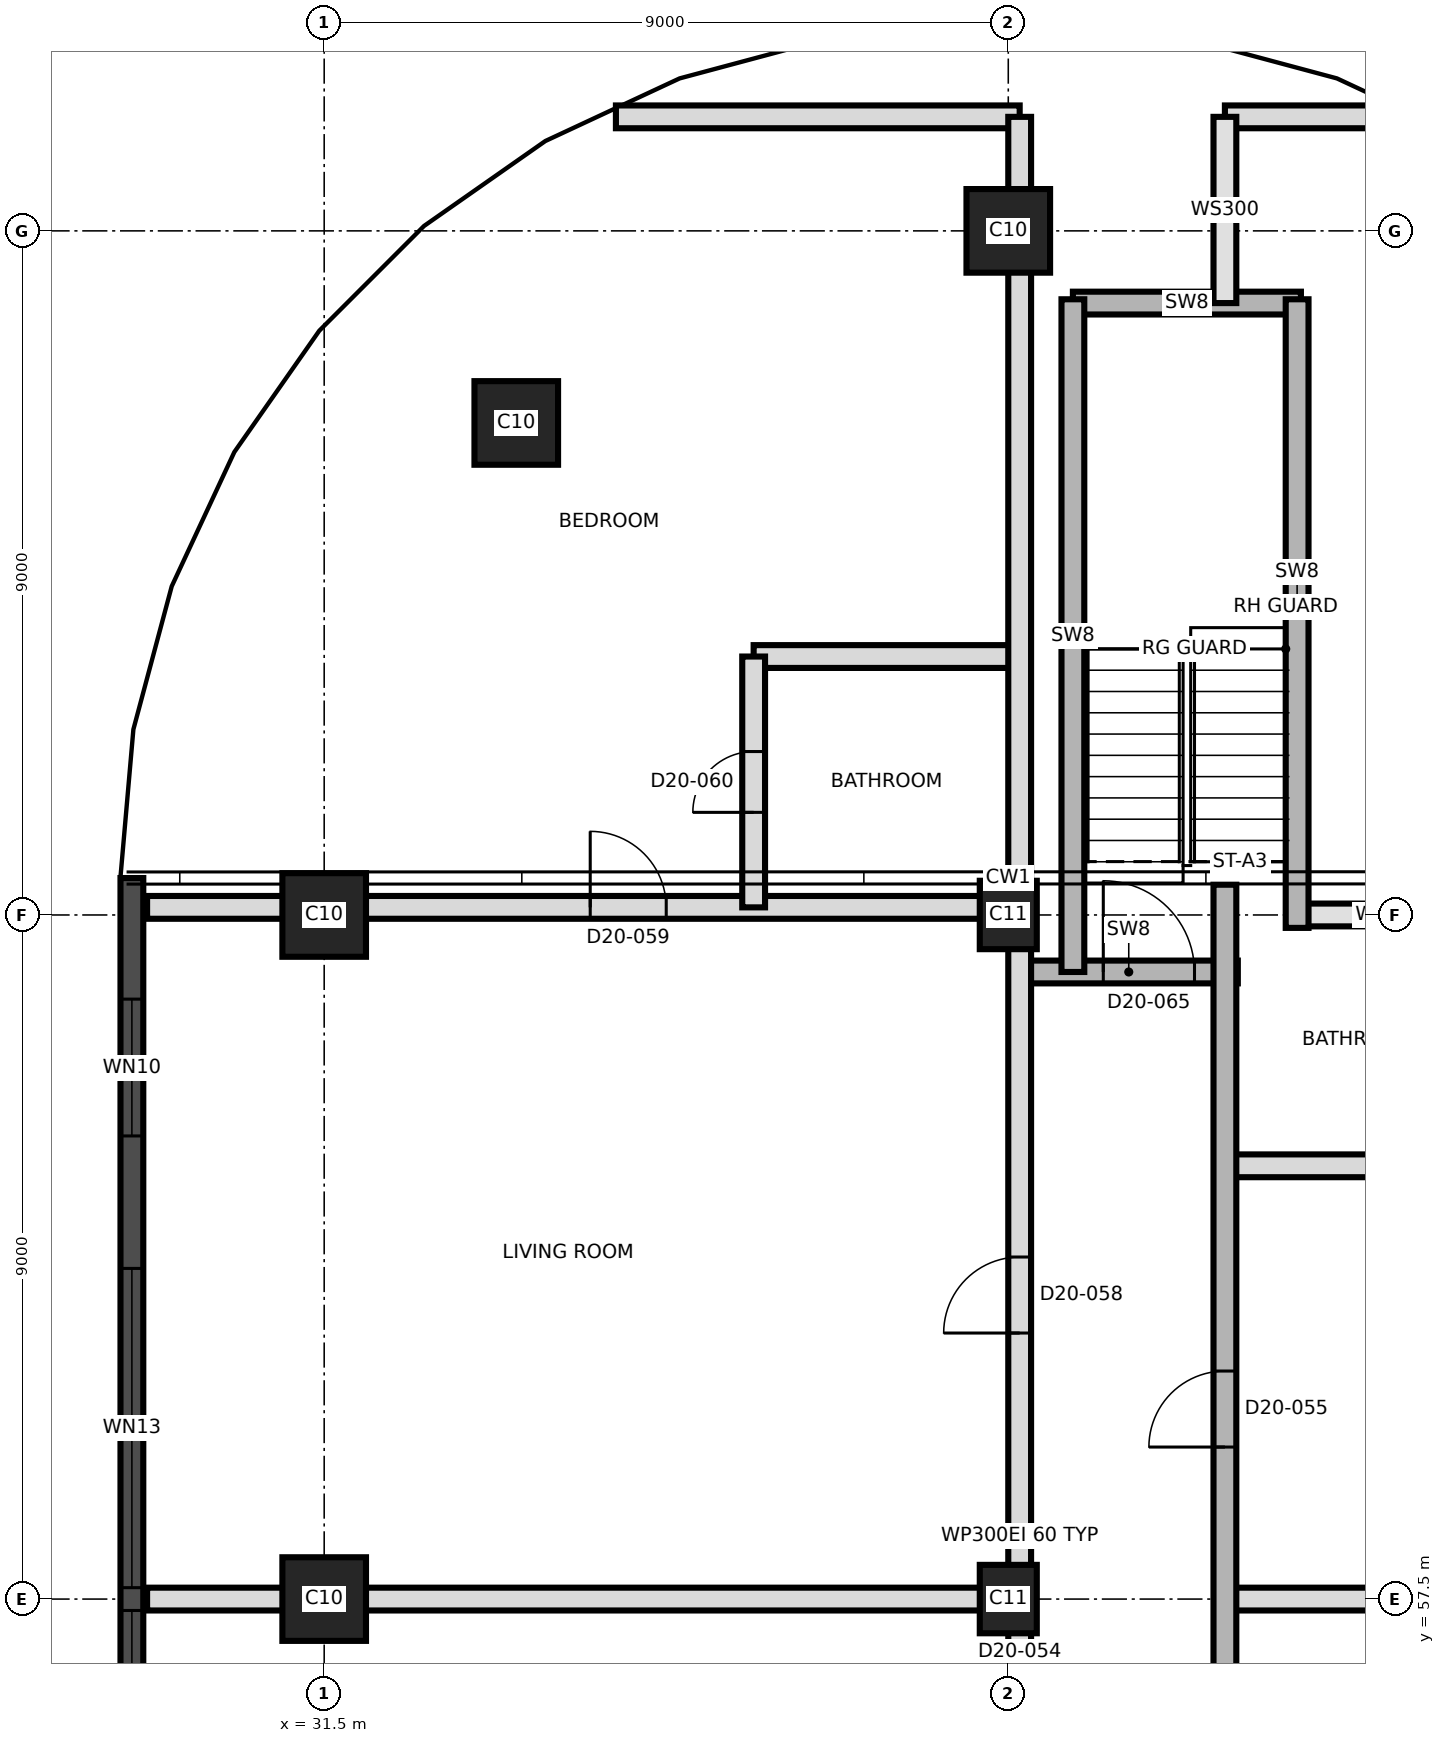
"""IFC4 building model, lengths in metres.
Left out: names, types, materials, properties, quantities, classifications, styles, units other than length and angle.
Written with IfcOpenShell. Run it as: python <this file> out.ifc"""

import sys

from ifc_helpers import new_model, si_unit, direction, frame, frame_2d, origin, origin_2d, place, context, subcontext, project, spatial, rectangle, extrude, element, fill, save


model = new_model("IFC4")
c1 = context("Model", 3, precision=1e-05, world=origin(), true_north=direction((0.0, 1.0)))
c2 = subcontext(c1, "Body", "Model", "MODEL_VIEW")
j1 = project(units=[si_unit("LENGTHUNIT", "METRE"), si_unit("PLANEANGLEUNIT", "RADIAN")], contexts=[c1])
p1 = place(None, origin())
s1 = spatial("IfcSite", under=j1, at=p1, CompositionType="ELEMENT")
p2 = place(p1, origin())
s2 = spatial("IfcBuilding", under=s1, at=p2, CompositionType="ELEMENT")
p3 = place(p2, frame((0.0, 0.0, 182.9)))
s3 = spatial("IfcBuildingStorey", under=s2, at=p3, CompositionType="ELEMENT", Elevation=182.9)
p4 = place(p3, frame((31.5, 57.5, 0.0), z_axis=(0.0, 0.0, 1.0), x_axis=(1.0, 0.0, 0.0)))
e1 = element("IfcColumn", 1, at=p4, inside=s3, PredefinedType="COLUMN", context=c2, shape_type="SweptSolid", body=[
    extrude(rectangle(XDim=1.1, YDim=1.1, at=origin_2d()), origin(), (0.0, 0.0, 1.0), 3.7),
])
p5 = place(p3, frame((40.5, 57.5, 0.0), z_axis=(0.0, 0.0, 1.0), x_axis=(0.0, 1.0, 0.0)))
e2 = element("IfcColumn", 2, at=p5, inside=s3, PredefinedType="COLUMN", context=c2, shape_type="SweptSolid", body=[
    extrude(rectangle(XDim=0.9, YDim=0.75, at=origin_2d()), origin(), (0.0, 0.0, 1.0), 3.7),
])
p6 = place(p3, frame((31.5, 66.5, 0.0), z_axis=(0.0, 0.0, 1.0), x_axis=(1.0, 0.0, 0.0)))
e3 = element("IfcColumn", 3, at=p6, inside=s3, PredefinedType="COLUMN", context=c2, shape_type="SweptSolid", body=[
    extrude(rectangle(XDim=1.1, YDim=1.1, at=origin_2d()), origin(), (0.0, 0.0, 1.0), 3.7),
])
p7 = place(p3, frame((40.5, 66.5, 0.0), z_axis=(0.0, 0.0, 1.0), x_axis=(0.0, 1.0, 0.0)))
e4 = element("IfcColumn", 4, at=p7, inside=s3, PredefinedType="COLUMN", context=c2, shape_type="SweptSolid", body=[
    extrude(rectangle(XDim=0.9, YDim=0.75, at=origin_2d()), origin(), (0.0, 0.0, 1.0), 3.7),
])
for number, where, z_axis, x_axis in (
    (5, (34.027, 72.973, 0.0), (0.0, 0.0, 1.0), (1.0, 0.0, 0.0)),
    (6, (40.5, 75.5, 0.0), (0.0, 0.0, 1.0), (1.0, 0.0, 0.0)),
):
    element("IfcColumn", number, at=place(p3, frame(where, z_axis=z_axis, x_axis=x_axis)), inside=s3, PredefinedType="COLUMN", context=c2, shape_type="SweptSolid", body=[
        extrude(rectangle(XDim=1.1, YDim=1.1, at=origin_2d()), origin(), (0.0, 0.0, 1.0), 3.7),
    ])
p8 = place(p3, frame((28.97, 66.986, 0.0), z_axis=(0.0, 0.0, 1.0), x_axis=(0.0, -1.0, 0.0)))
e7 = element("IfcWall", 7, at=p8, inside=s3, PredefinedType="SOLIDWALL", context=c2, shape_type="SweptSolid", body=[
    extrude(rectangle(XDim=32.976, YDim=0.3, at=frame_2d((16.488, 0.0))), origin(), (0.0, 0.0, 1.0), 3.4),
])
p9 = place(p8, frame((1.593, 0.0, 0.3)))
e8 = element("IfcOpeningElement", 8, at=p9, cuts=e7, PredefinedType="OPENING", context=c2, shape_type="SweptSolid", body=[
    extrude(rectangle(XDim=1.8, YDim=2.4, at=frame_2d((0.9, 1.2))), frame((0.0, 0.16, 0.0), z_axis=(0.0, -1.0, 0.0), x_axis=(1.0, 0.0, 0.0)), (0.0, 0.0, 1.0), 0.32),
])
p10 = place(p8, frame((5.136, 0.0, 0.9)))
e9 = element("IfcOpeningElement", 9, at=p10, cuts=e7, PredefinedType="OPENING", context=c2, shape_type="SweptSolid", body=[
    extrude(rectangle(XDim=4.2, YDim=1.7, at=frame_2d((2.1, 0.85))), frame((0.0, 0.16, 0.0), z_axis=(0.0, -1.0, 0.0), x_axis=(1.0, 0.0, 0.0)), (0.0, 0.0, 1.0), 0.32),
])
p11 = place(p8, frame((9.636, 0.0, 0.9)))
e10 = element("IfcOpeningElement", 10, at=p11, cuts=e7, PredefinedType="OPENING", context=c2, shape_type="SweptSolid", body=[
    extrude(rectangle(XDim=4.2, YDim=1.7, at=frame_2d((2.1, 0.85))), frame((0.0, 0.16, 0.0), z_axis=(0.0, -1.0, 0.0), x_axis=(1.0, 0.0, 0.0)), (0.0, 0.0, 1.0), 0.32),
])
p12 = place(p8, frame((14.136, 0.0, 0.9)))
e11 = element("IfcOpeningElement", 11, at=p12, cuts=e7, PredefinedType="OPENING", context=c2, shape_type="SweptSolid", body=[
    extrude(rectangle(XDim=4.2, YDim=1.7, at=frame_2d((2.1, 0.85))), frame((0.0, 0.16, 0.0), z_axis=(0.0, -1.0, 0.0), x_axis=(1.0, 0.0, 0.0)), (0.0, 0.0, 1.0), 0.32),
])
p13 = place(p8, frame((18.636, 0.0, 0.9)))
e12 = element("IfcOpeningElement", 12, at=p13, cuts=e7, PredefinedType="OPENING", context=c2, shape_type="SweptSolid", body=[
    extrude(rectangle(XDim=4.2, YDim=1.7, at=frame_2d((2.1, 0.85))), frame((0.0, 0.16, 0.0), z_axis=(0.0, -1.0, 0.0), x_axis=(1.0, 0.0, 0.0)), (0.0, 0.0, 1.0), 0.32),
])
p14 = place(p8, frame((23.136, 0.0, 0.9)))
e13 = element("IfcOpeningElement", 13, at=p14, cuts=e7, PredefinedType="OPENING", context=c2, shape_type="SweptSolid", body=[
    extrude(rectangle(XDim=4.2, YDim=1.7, at=frame_2d((2.1, 0.85))), frame((0.0, 0.16, 0.0), z_axis=(0.0, -1.0, 0.0), x_axis=(1.0, 0.0, 0.0)), (0.0, 0.0, 1.0), 0.32),
])
p15 = place(p8, frame((29.331, 0.0, 0.3)))
e14 = element("IfcOpeningElement", 14, at=p15, cuts=e7, PredefinedType="OPENING", context=c2, shape_type="SweptSolid", body=[
    extrude(rectangle(XDim=1.8, YDim=2.4, at=frame_2d((0.9, 1.2))), frame((0.0, 0.16, 0.0), z_axis=(0.0, -1.0, 0.0), x_axis=(1.0, 0.0, 0.0)), (0.0, 0.0, 1.0), 0.32),
])
p16 = place(p3, frame((29.17, 57.5, 0.0), z_axis=(0.0, 0.0, 1.0), x_axis=(1.0, 0.0, 0.0)))
e15 = element("IfcWall", 15, at=p16, inside=s3, PredefinedType="PARTITIONING", context=c2, shape_type="SweptSolid", body=[
    extrude(rectangle(XDim=11.48, YDim=0.3, at=frame_2d((5.74, 0.0))), origin(), (0.0, 0.0, 1.0), 3.4),
])
p17 = place(p3, frame((43.35, 57.5, 0.0), z_axis=(0.0, 0.0, 1.0), x_axis=(1.0, 0.0, 0.0)))
e16 = element("IfcWall", 16, at=p17, inside=s3, PredefinedType="PARTITIONING", context=c2, shape_type="SweptSolid", body=[
    extrude(rectangle(XDim=8.66, YDim=0.3, at=frame_2d((4.33, 0.0))), origin(), (0.0, 0.0, 1.0), 3.4),
])
p18 = place(p3, frame((43.35, 63.2, 0.0), z_axis=(0.0, 0.0, 1.0), x_axis=(1.0, 0.0, 0.0)))
e17 = element("IfcWall", 17, at=p18, inside=s3, PredefinedType="PARTITIONING", context=c2, shape_type="SweptSolid", body=[
    extrude(rectangle(XDim=8.62, YDim=0.3, at=frame_2d((4.31, 0.0))), origin(), (0.0, 0.0, 1.0), 3.4),
])
p19 = place(p18, frame((4.65, 0.0, 0.0)))
e18 = element("IfcOpeningElement", 18, at=p19, cuts=e17, PredefinedType="OPENING", context=c2, shape_type="SweptSolid", body=[
    extrude(rectangle(XDim=1.0, YDim=2.1, at=frame_2d((0.5, 1.05))), frame((0.0, 0.16, 0.0), z_axis=(0.0, -1.0, 0.0), x_axis=(1.0, 0.0, 0.0)), (0.0, 0.0, 1.0), 0.32),
])
p20 = place(p3, frame((40.65, 65.75, 0.0), z_axis=(0.0, 0.0, 1.0), x_axis=(1.0, 0.0, 0.0)))
e19 = element("IfcWall", 19, at=p20, inside=s3, PredefinedType="SHEAR", context=c2, shape_type="SweptSolid", body=[
    extrude(rectangle(XDim=2.87, YDim=0.3, at=frame_2d((1.435, 0.0))), origin(), (0.0, 0.0, 1.0), 3.4),
])
p21 = place(p20, frame((1.1, 0.0, 0.0)))
e20 = element("IfcOpeningElement", 20, at=p21, cuts=e19, PredefinedType="OPENING", context=c2, shape_type="SweptSolid", body=[
    extrude(rectangle(XDim=1.2, YDim=2.1, at=frame_2d((0.6, 1.05))), frame((0.0, 0.16, 0.0), z_axis=(0.0, -1.0, 0.0), x_axis=(1.0, 0.0, 0.0)), (0.0, 0.0, 1.0), 0.32),
])
p22 = place(p3, frame((44.18, 66.5, 0.0), z_axis=(0.0, 0.0, 1.0), x_axis=(1.0, 0.0, 0.0)))
e21 = element("IfcWall", 21, at=p22, inside=s3, PredefinedType="SOLIDWALL", context=c2, shape_type="SweptSolid", body=[
    extrude(rectangle(XDim=2.67, YDim=0.3, at=frame_2d((1.335, 0.0))), origin(), (0.0, 0.0, 1.0), 3.4),
])
p23 = place(p3, frame((29.17, 66.6, 0.0), z_axis=(0.0, 0.0, 1.0), x_axis=(1.0, 0.0, 0.0)))
e22 = element("IfcWall", 22, at=p23, inside=s3, PredefinedType="PARTITIONING", context=c2, shape_type="SweptSolid", body=[
    extrude(rectangle(XDim=11.48, YDim=0.3, at=frame_2d((5.74, 0.0))), origin(), (0.0, 0.0, 1.0), 3.4),
])
p24 = place(p23, frame((5.83, 0.0, 0.0)))
e23 = element("IfcOpeningElement", 23, at=p24, cuts=e22, PredefinedType="OPENING", context=c2, shape_type="SweptSolid", body=[
    extrude(rectangle(XDim=1.0, YDim=2.1, at=frame_2d((0.5, 1.05))), frame((0.0, 0.16, 0.0), z_axis=(0.0, -1.0, 0.0), x_axis=(1.0, 0.0, 0.0)), (0.0, 0.0, 1.0), 0.32),
])
p25 = place(p3, frame((37.15, 69.9, 0.0), z_axis=(0.0, 0.0, 1.0), x_axis=(1.0, 0.0, 0.0)))
e24 = element("IfcWall", 24, at=p25, inside=s3, PredefinedType="PARTITIONING", context=c2, shape_type="SweptSolid", body=[
    extrude(rectangle(XDim=3.5, YDim=0.3, at=frame_2d((1.75, 0.0))), origin(), (0.0, 0.0, 1.0), 3.4),
])
p26 = place(p3, frame((41.35, 74.55, 0.0), z_axis=(0.0, 0.0, 1.0), x_axis=(1.0, 0.0, 0.0)))
e25 = element("IfcWall", 25, at=p26, inside=s3, PredefinedType="SHEAR", context=c2, shape_type="SweptSolid", body=[
    extrude(rectangle(XDim=3.0, YDim=0.3, at=frame_2d((1.5, 0.0))), origin(), (0.0, 0.0, 1.0), 3.4),
])
p27 = place(p3, frame((35.338, 77.0, 0.0), z_axis=(0.0, 0.0, 1.0), x_axis=(1.0, 0.0, 0.0)))
e26 = element("IfcWall", 26, at=p27, inside=s3, PredefinedType="PARTITIONING", context=c2, shape_type="SweptSolid", body=[
    extrude(rectangle(XDim=5.312, YDim=0.3, at=frame_2d((2.656, 0.0))), origin(), (0.0, 0.0, 1.0), 3.4),
])
p28 = place(p3, frame((43.35, 77.0, 0.0), z_axis=(0.0, 0.0, 1.0), x_axis=(1.0, 0.0, 0.0)))
e27 = element("IfcWall", 27, at=p28, inside=s3, PredefinedType="PARTITIONING", context=c2, shape_type="SweptSolid", body=[
    extrude(rectangle(XDim=2.312, YDim=0.3, at=frame_2d((1.156, 0.0))), origin(), (0.0, 0.0, 1.0), 3.4),
])
p29 = place(p3, frame((37.15, 66.6, 0.0), z_axis=(0.0, 0.0, 1.0), x_axis=(0.0, 1.0, 0.0)))
e28 = element("IfcWall", 28, at=p29, inside=s3, PredefinedType="PARTITIONING", context=c2, shape_type="SweptSolid", body=[
    extrude(rectangle(XDim=3.3, YDim=0.3, at=frame_2d((1.65, 0.0))), origin(), (0.0, 0.0, 1.0), 3.4),
])
p30 = place(p29, frame((1.25, 0.0, 0.0)))
e29 = element("IfcOpeningElement", 29, at=p30, cuts=e28, PredefinedType="OPENING", context=c2, shape_type="SweptSolid", body=[
    extrude(rectangle(XDim=0.8, YDim=2.1, at=frame_2d((0.4, 1.05))), frame((0.0, 0.16, 0.0), z_axis=(0.0, -1.0, 0.0), x_axis=(1.0, 0.0, 0.0)), (0.0, 0.0, 1.0), 0.32),
])
p31 = place(p3, frame((40.65, 39.65, 0.0), z_axis=(0.0, 0.0, 1.0), x_axis=(0.0, 1.0, 0.0)))
e30 = element("IfcWall", 30, at=p31, inside=s3, PredefinedType="PARTITIONING", context=c2, shape_type="SweptSolid", body=[
    extrude(rectangle(XDim=37.35, YDim=0.3, at=frame_2d((18.675, 0.0))), origin(), (0.0, 0.0, 1.0), 3.4),
])
p32 = place(p31, frame((1.0, 0.0, 0.0)))
e31 = element("IfcOpeningElement", 31, at=p32, cuts=e30, PredefinedType="OPENING", context=c2, shape_type="SweptSolid", body=[
    extrude(rectangle(XDim=1.0, YDim=2.1, at=frame_2d((0.5, 1.05))), frame((0.0, 0.16, 0.0), z_axis=(0.0, -1.0, 0.0), x_axis=(1.0, 0.0, 0.0)), (0.0, 0.0, 1.0), 0.32),
])
p33 = place(p31, frame((6.85, 0.0, 0.0)))
e32 = element("IfcOpeningElement", 32, at=p33, cuts=e30, PredefinedType="OPENING", context=c2, shape_type="SweptSolid", body=[
    extrude(rectangle(XDim=1.0, YDim=2.1, at=frame_2d((0.5, 1.05))), frame((0.0, 0.16, 0.0), z_axis=(0.0, -1.0, 0.0), x_axis=(1.0, 0.0, 0.0)), (0.0, 0.0, 1.0), 0.32),
])
p34 = place(p31, frame((10.0, 0.0, 0.0)))
e33 = element("IfcOpeningElement", 33, at=p34, cuts=e30, PredefinedType="OPENING", context=c2, shape_type="SweptSolid", body=[
    extrude(rectangle(XDim=1.0, YDim=2.1, at=frame_2d((0.5, 1.05))), frame((0.0, 0.16, 0.0), z_axis=(0.0, -1.0, 0.0), x_axis=(1.0, 0.0, 0.0)), (0.0, 0.0, 1.0), 0.32),
])
p35 = place(p31, frame((15.85, 0.0, 0.0)))
e34 = element("IfcOpeningElement", 34, at=p35, cuts=e30, PredefinedType="OPENING", context=c2, shape_type="SweptSolid", body=[
    extrude(rectangle(XDim=1.0, YDim=2.1, at=frame_2d((0.5, 1.05))), frame((0.0, 0.16, 0.0), z_axis=(0.0, -1.0, 0.0), x_axis=(1.0, 0.0, 0.0)), (0.0, 0.0, 1.0), 0.32),
])
p36 = place(p31, frame((21.35, 0.0, 0.0)))
e35 = element("IfcOpeningElement", 35, at=p36, cuts=e30, PredefinedType="OPENING", context=c2, shape_type="SweptSolid", body=[
    extrude(rectangle(XDim=1.0, YDim=2.1, at=frame_2d((0.5, 1.05))), frame((0.0, 0.16, 0.0), z_axis=(0.0, -1.0, 0.0), x_axis=(1.0, 0.0, 0.0)), (0.0, 0.0, 1.0), 0.32),
])
p37 = place(p3, frame((41.35, 65.75, 0.0), z_axis=(0.0, 0.0, 1.0), x_axis=(0.0, 1.0, 0.0)))
e36 = element("IfcWall", 36, at=p37, inside=s3, PredefinedType="SHEAR", context=c2, shape_type="SweptSolid", body=[
    extrude(rectangle(XDim=8.85, YDim=0.3, at=frame_2d((4.425, 0.0))), origin(), (0.0, 0.0, 1.0), 3.4),
])
p38 = place(p3, frame((43.35, 39.65, 0.0), z_axis=(0.0, 0.0, 1.0), x_axis=(0.0, 1.0, 0.0)))
e37 = element("IfcWall", 37, at=p38, inside=s3, PredefinedType="SHEAR", context=c2, shape_type="SweptSolid", body=[
    extrude(rectangle(XDim=27.248, YDim=0.3, at=frame_2d((13.624, 0.0))), origin(), (0.0, 0.0, 1.0), 3.4),
])
p39 = place(p38, frame((1.0, 0.0, 0.0)))
e38 = element("IfcOpeningElement", 38, at=p39, cuts=e37, PredefinedType="OPENING", context=c2, shape_type="SweptSolid", body=[
    extrude(rectangle(XDim=1.0, YDim=2.1, at=frame_2d((0.5, 1.05))), frame((0.0, 0.16, 0.0), z_axis=(0.0, -1.0, 0.0), x_axis=(1.0, 0.0, 0.0)), (0.0, 0.0, 1.0), 0.32),
])
p40 = place(p38, frame((6.85, 0.0, 0.0)))
e39 = element("IfcOpeningElement", 39, at=p40, cuts=e37, PredefinedType="OPENING", context=c2, shape_type="SweptSolid", body=[
    extrude(rectangle(XDim=1.0, YDim=2.1, at=frame_2d((0.5, 1.05))), frame((0.0, 0.16, 0.0), z_axis=(0.0, -1.0, 0.0), x_axis=(1.0, 0.0, 0.0)), (0.0, 0.0, 1.0), 0.32),
])
p41 = place(p38, frame((12.85, 0.0, 0.0)))
e40 = element("IfcOpeningElement", 40, at=p41, cuts=e37, PredefinedType="OPENING", context=c2, shape_type="SweptSolid", body=[
    extrude(rectangle(XDim=1.0, YDim=2.1, at=frame_2d((0.5, 1.05))), frame((0.0, 0.16, 0.0), z_axis=(0.0, -1.0, 0.0), x_axis=(1.0, 0.0, 0.0)), (0.0, 0.0, 1.0), 0.32),
])
p42 = place(p38, frame((19.85, 0.0, 0.0)))
e41 = element("IfcOpeningElement", 41, at=p42, cuts=e37, PredefinedType="OPENING", context=c2, shape_type="SweptSolid", body=[
    extrude(rectangle(XDim=1.0, YDim=2.1, at=frame_2d((0.5, 1.05))), frame((0.0, 0.16, 0.0), z_axis=(0.0, -1.0, 0.0), x_axis=(1.0, 0.0, 0.0)), (0.0, 0.0, 1.0), 0.32),
])
p43 = place(p3, frame((43.35, 74.55, 0.0), z_axis=(0.0, 0.0, 1.0), x_axis=(0.0, 1.0, 0.0)))
e42 = element("IfcWall", 42, at=p43, inside=s3, PredefinedType="SOLIDWALL", context=c2, shape_type="SweptSolid", body=[
    extrude(rectangle(XDim=2.45, YDim=0.3, at=frame_2d((1.225, 0.0))), origin(), (0.0, 0.0, 1.0), 3.4),
])
p44 = place(p3, frame((44.3, 66.33, 0.0), z_axis=(0.0, 0.0, 1.0), x_axis=(0.0, 1.0, 0.0)))
e43 = element("IfcWall", 43, at=p44, inside=s3, PredefinedType="SHEAR", context=c2, shape_type="SweptSolid", body=[
    extrude(rectangle(XDim=8.27, YDim=0.3, at=frame_2d((4.135, 0.0))), origin(), (0.0, 0.0, 1.0), 3.4),
])
p45 = place(p9, origin())
e44 = element("IfcWindow", 44, at=p45, inside=s3, PartitioningType="SINGLE_PANEL", PredefinedType="WINDOW", context=c2, shape_type="SweptSolid", body=[
    extrude(rectangle(XDim=1.8, YDim=2.4, at=frame_2d((0.9, 1.2))), frame((0.0, 0.03, 0.0), z_axis=(0.0, -1.0, 0.0), x_axis=(1.0, 0.0, 0.0)), (0.0, 0.0, 1.0), 0.06),
])
fill(e8, e44)
p46 = place(p10, origin())
e45 = element("IfcWindow", 45, at=p46, inside=s3, PartitioningType="SINGLE_PANEL", PredefinedType="WINDOW", context=c2, shape_type="SweptSolid", body=[
    extrude(rectangle(XDim=4.2, YDim=1.7, at=frame_2d((2.1, 0.85))), frame((0.0, 0.03, 0.0), z_axis=(0.0, -1.0, 0.0), x_axis=(1.0, 0.0, 0.0)), (0.0, 0.0, 1.0), 0.06),
])
fill(e9, e45)
p47 = place(p11, origin())
e46 = element("IfcWindow", 46, at=p47, inside=s3, PartitioningType="SINGLE_PANEL", PredefinedType="WINDOW", context=c2, shape_type="SweptSolid", body=[
    extrude(rectangle(XDim=4.2, YDim=1.7, at=frame_2d((2.1, 0.85))), frame((0.0, 0.03, 0.0), z_axis=(0.0, -1.0, 0.0), x_axis=(1.0, 0.0, 0.0)), (0.0, 0.0, 1.0), 0.06),
])
fill(e10, e46)
p48 = place(p42, origin())
e47 = element("IfcDoor", 47, at=p48, inside=s3, OperationType="SINGLE_SWING_LEFT", PredefinedType="DOOR", context=c2, shape_type="SweptSolid", body=[
    extrude(rectangle(XDim=1.0, YDim=2.1, at=frame_2d((0.5, 1.05))), frame((0.0, 0.025, 0.0), z_axis=(0.0, -1.0, 0.0), x_axis=(1.0, 0.0, 0.0)), (0.0, 0.0, 1.0), 0.05),
])
fill(e41, e47)
p49 = place(p36, origin())
e48 = element("IfcDoor", 48, at=p49, inside=s3, OperationType="SINGLE_SWING_LEFT", PredefinedType="DOOR", context=c2, shape_type="SweptSolid", body=[
    extrude(rectangle(XDim=1.0, YDim=2.1, at=frame_2d((0.5, 1.05))), frame((0.0, 0.025, 0.0), z_axis=(0.0, -1.0, 0.0), x_axis=(1.0, 0.0, 0.0)), (0.0, 0.0, 1.0), 0.05),
])
fill(e35, e48)
p50 = place(p24, origin())
e49 = element("IfcDoor", 49, at=p50, inside=s3, OperationType="SINGLE_SWING_RIGHT", PredefinedType="DOOR", context=c2, shape_type="SweptSolid", body=[
    extrude(rectangle(XDim=1.0, YDim=2.1, at=frame_2d((0.5, 1.05))), frame((0.0, 0.025, 0.0), z_axis=(0.0, -1.0, 0.0), x_axis=(1.0, 0.0, 0.0)), (0.0, 0.0, 1.0), 0.05),
])
fill(e23, e49)
p51 = place(p30, origin())
e50 = element("IfcDoor", 50, at=p51, inside=s3, OperationType="SINGLE_SWING_LEFT", PredefinedType="DOOR", context=c2, shape_type="SweptSolid", body=[
    extrude(rectangle(XDim=0.8, YDim=2.1, at=frame_2d((0.4, 1.05))), frame((0.0, 0.025, 0.0), z_axis=(0.0, -1.0, 0.0), x_axis=(1.0, 0.0, 0.0)), (0.0, 0.0, 1.0), 0.05),
])
fill(e29, e50)
p52 = place(p21, origin())
e51 = element("IfcDoor", 51, at=p52, inside=s3, OperationType="SINGLE_SWING_RIGHT", PredefinedType="DOOR", context=c2, shape_type="SweptSolid", body=[
    extrude(rectangle(XDim=1.2, YDim=2.1, at=frame_2d((0.6, 1.05))), frame((0.0, 0.025, 0.0), z_axis=(0.0, -1.0, 0.0), x_axis=(1.0, 0.0, 0.0)), (0.0, 0.0, 1.0), 0.05),
])
fill(e20, e51)
save(model, sys.argv[1])
